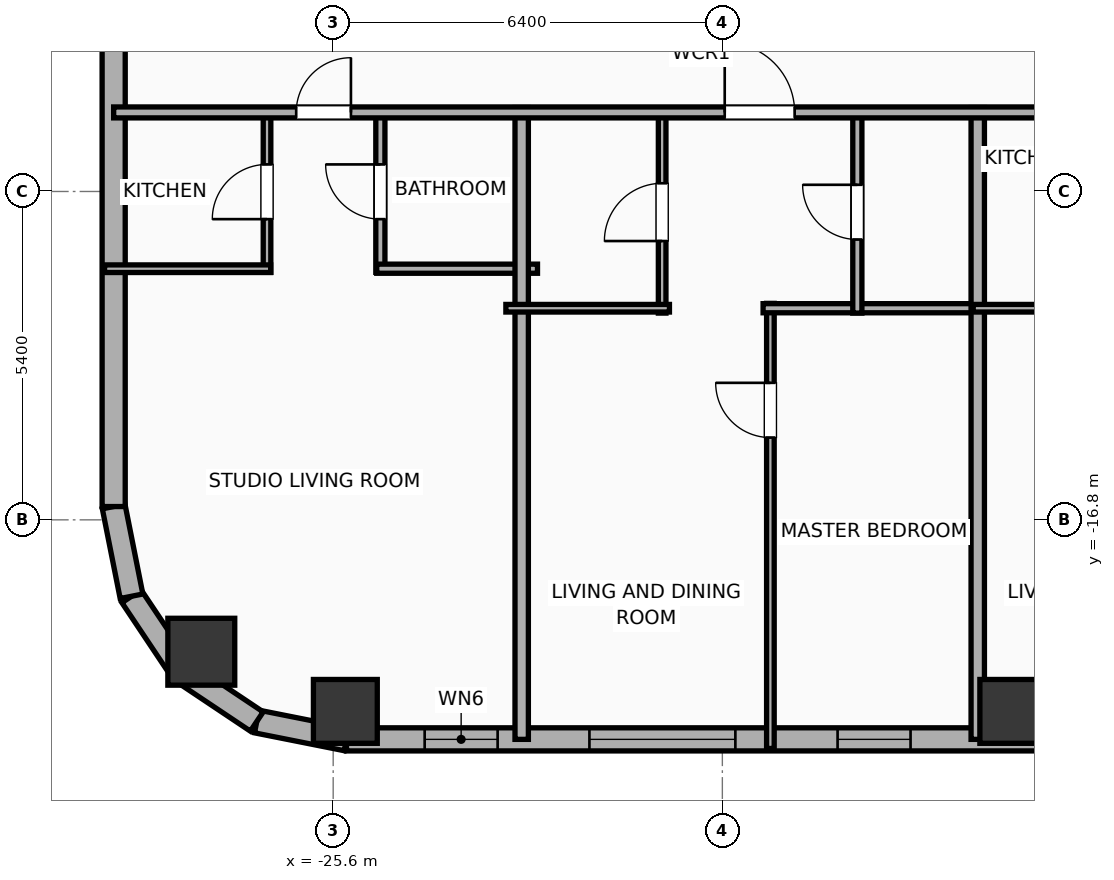
"""IFC4 building model, lengths in metres.
Left out: names, types, materials, properties, quantities, classifications, styles, units other than length and angle.
Written with IfcOpenShell. Run it as: python <this file> out.ifc"""

import sys

from ifc_helpers import new_model, si_unit, direction, frame, frame_2d, origin, origin_2d, place, context, subcontext, project, spatial, rectangle, hollow_rectangle, hollow_circle, extrude, element, fill, save


model = new_model("IFC4")
c1 = context("Model", 3, precision=1e-05, world=origin(), true_north=direction((0.0, 1.0)))
c2 = subcontext(c1, "Body", "Model", "MODEL_VIEW")
j1 = project(units=[si_unit("LENGTHUNIT", "METRE"), si_unit("PLANEANGLEUNIT", "RADIAN")], contexts=[c1])
p1 = place(None, origin())
s1 = spatial("IfcSite", under=j1, at=p1, CompositionType="ELEMENT")
p2 = place(p1, origin())
s2 = spatial("IfcBuilding", under=s1, at=p2, CompositionType="ELEMENT")
p3 = place(p2, frame((0.0, 0.0, 136.5)))
s3 = spatial("IfcBuildingStorey", under=s2, at=p3, CompositionType="ELEMENT", Elevation=136.5)
for number, where, z_axis, x_axis in (
    (1, (-25.4, -19.95, 0.0), (0.0, 0.0, 1.0), (1.0, 0.0, 0.0)),
    (2, (-14.44, -19.95, 0.0), (0.0, 0.0, 1.0), (1.0, 0.0, 0.0)),
):
    element("IfcColumn", number, at=place(p3, frame(where, z_axis=z_axis, x_axis=x_axis)), inside=s3, PredefinedType="COLUMN", context=c2, shape_type="SweptSolid", body=[
        extrude(hollow_rectangle(XDim=1.05, YDim=1.05, WallThickness=0.036, at=origin_2d()), origin(), (0.0, 0.0, 1.0), 3.865),
    ])
p4 = place(p3, frame((-27.769, -18.969, 0.0), z_axis=(0.0, 0.0, 1.0), x_axis=(1.0, 0.0, 0.0)))
e3 = element("IfcColumn", 3, at=p4, inside=s3, PredefinedType="COLUMN", context=c2, shape_type="SweptSolid", body=[
    extrude(hollow_circle(Radius=0.55, WallThickness=0.036, at=origin_2d()), origin(), (0.0, 0.0, 1.0), 3.865),
])
p5 = place(p3, frame((29.381, -20.41, 0.0), z_axis=(0.0, 0.0, 1.0), x_axis=(-1.0, 0.0, 0.0)))
e4 = element("IfcWall", 4, at=p5, inside=s3, PredefinedType="ELEMENTEDWALL", context=c2, shape_type="SweptSolid", body=[
    extrude(rectangle(XDim=54.763, YDim=0.38, at=frame_2d((27.381, 0.0))), origin(), (0.0, 0.0, 1.0), 2.39),
])
p6 = place(p5, frame((7.295, 0.0, 0.75)))
e5 = element("IfcOpeningElement", 5, at=p6, cuts=e4, PredefinedType="OPENING", context=c2, shape_type="SweptSolid", body=[
    extrude(rectangle(XDim=2.4, YDim=1.45, at=frame_2d((1.2, 0.725))), frame((0.0, 0.2, 0.0), z_axis=(0.0, -1.0, 0.0), x_axis=(1.0, 0.0, 0.0)), (0.0, 0.0, 1.0), 0.4),
])
p7 = place(p5, frame((18.486, 0.0, 0.75)))
e6 = element("IfcOpeningElement", 6, at=p7, cuts=e4, PredefinedType="OPENING", context=c2, shape_type="SweptSolid", body=[
    extrude(rectangle(XDim=2.4, YDim=1.45, at=frame_2d((1.2, 0.725))), frame((0.0, 0.2, 0.0), z_axis=(0.0, -1.0, 0.0), x_axis=(1.0, 0.0, 0.0)), (0.0, 0.0, 1.0), 0.4),
])
p8 = place(p5, frame((33.877, 0.0, 0.75)))
e7 = element("IfcOpeningElement", 7, at=p8, cuts=e4, PredefinedType="OPENING", context=c2, shape_type="SweptSolid", body=[
    extrude(rectangle(XDim=2.4, YDim=1.45, at=frame_2d((1.2, 0.725))), frame((0.0, 0.2, 0.0), z_axis=(0.0, -1.0, 0.0), x_axis=(1.0, 0.0, 0.0)), (0.0, 0.0, 1.0), 0.4),
])
p9 = place(p5, frame((48.367, 0.0, 0.75)))
e8 = element("IfcOpeningElement", 8, at=p9, cuts=e4, PredefinedType="OPENING", context=c2, shape_type="SweptSolid", body=[
    extrude(rectangle(XDim=2.4, YDim=1.45, at=frame_2d((1.2, 0.725))), frame((0.0, 0.2, 0.0), z_axis=(0.0, -1.0, 0.0), x_axis=(1.0, 0.0, 0.0)), (0.0, 0.0, 1.0), 0.4),
])
p10 = place(p5, frame((52.277, 0.0, 0.55)))
e9 = element("IfcOpeningElement", 9, at=p10, cuts=e4, PredefinedType="OPENING", context=c2, shape_type="SweptSolid", body=[
    extrude(rectangle(XDim=1.2, YDim=1.15, at=frame_2d((0.6, 0.575))), frame((0.0, 0.2, 0.0), z_axis=(0.0, -1.0, 0.0), x_axis=(1.0, 0.0, 0.0)), (0.0, 0.0, 1.0), 0.4),
])
p11 = place(p5, frame((45.486, 0.0, 0.55)))
e10 = element("IfcOpeningElement", 10, at=p11, cuts=e4, PredefinedType="OPENING", context=c2, shape_type="SweptSolid", body=[
    extrude(rectangle(XDim=1.2, YDim=1.15, at=frame_2d((0.6, 0.575))), frame((0.0, 0.2, 0.0), z_axis=(0.0, -1.0, 0.0), x_axis=(1.0, 0.0, 0.0)), (0.0, 0.0, 1.0), 0.4),
])
p12 = place(p5, frame((41.736, 0.0, 0.55)))
e11 = element("IfcOpeningElement", 11, at=p12, cuts=e4, PredefinedType="OPENING", context=c2, shape_type="SweptSolid", body=[
    extrude(rectangle(XDim=1.2, YDim=1.15, at=frame_2d((0.6, 0.575))), frame((0.0, 0.2, 0.0), z_axis=(0.0, -1.0, 0.0), x_axis=(1.0, 0.0, 0.0)), (0.0, 0.0, 1.0), 0.4),
])
p13 = place(p5, frame((37.986, 0.0, 0.55)))
e12 = element("IfcOpeningElement", 12, at=p13, cuts=e4, PredefinedType="OPENING", context=c2, shape_type="SweptSolid", body=[
    extrude(rectangle(XDim=1.2, YDim=1.15, at=frame_2d((0.6, 0.575))), frame((0.0, 0.2, 0.0), z_axis=(0.0, -1.0, 0.0), x_axis=(1.0, 0.0, 0.0)), (0.0, 0.0, 1.0), 0.4),
])
p14 = place(p5, frame((30.486, 0.0, 0.55)))
e13 = element("IfcOpeningElement", 13, at=p14, cuts=e4, PredefinedType="OPENING", context=c2, shape_type="SweptSolid", body=[
    extrude(rectangle(XDim=1.2, YDim=1.15, at=frame_2d((0.6, 0.575))), frame((0.0, 0.2, 0.0), z_axis=(0.0, -1.0, 0.0), x_axis=(1.0, 0.0, 0.0)), (0.0, 0.0, 1.0), 0.4),
])
p15 = place(p5, frame((26.736, 0.0, 0.55)))
e14 = element("IfcOpeningElement", 14, at=p15, cuts=e4, PredefinedType="OPENING", context=c2, shape_type="SweptSolid", body=[
    extrude(rectangle(XDim=1.2, YDim=1.15, at=frame_2d((0.6, 0.575))), frame((0.0, 0.2, 0.0), z_axis=(0.0, -1.0, 0.0), x_axis=(1.0, 0.0, 0.0)), (0.0, 0.0, 1.0), 0.4),
])
p16 = place(p5, frame((22.986, 0.0, 0.55)))
e15 = element("IfcOpeningElement", 15, at=p16, cuts=e4, PredefinedType="OPENING", context=c2, shape_type="SweptSolid", body=[
    extrude(rectangle(XDim=1.2, YDim=1.15, at=frame_2d((0.6, 0.575))), frame((0.0, 0.2, 0.0), z_axis=(0.0, -1.0, 0.0), x_axis=(1.0, 0.0, 0.0)), (0.0, 0.0, 1.0), 0.4),
])
p17 = place(p5, frame((15.486, 0.0, 0.55)))
e16 = element("IfcOpeningElement", 16, at=p17, cuts=e4, PredefinedType="OPENING", context=c2, shape_type="SweptSolid", body=[
    extrude(rectangle(XDim=1.2, YDim=1.15, at=frame_2d((0.6, 0.575))), frame((0.0, 0.2, 0.0), z_axis=(0.0, -1.0, 0.0), x_axis=(1.0, 0.0, 0.0)), (0.0, 0.0, 1.0), 0.4),
])
p18 = place(p5, frame((11.736, 0.0, 0.55)))
e17 = element("IfcOpeningElement", 17, at=p18, cuts=e4, PredefinedType="OPENING", context=c2, shape_type="SweptSolid", body=[
    extrude(rectangle(XDim=1.2, YDim=1.15, at=frame_2d((0.6, 0.575))), frame((0.0, 0.2, 0.0), z_axis=(0.0, -1.0, 0.0), x_axis=(1.0, 0.0, 0.0)), (0.0, 0.0, 1.0), 0.4),
])
p19 = place(p5, frame((3.286, 0.0, 0.55)))
e18 = element("IfcOpeningElement", 18, at=p19, cuts=e4, PredefinedType="OPENING", context=c2, shape_type="SweptSolid", body=[
    extrude(rectangle(XDim=1.2, YDim=1.15, at=frame_2d((0.6, 0.575))), frame((0.0, 0.2, 0.0), z_axis=(0.0, -1.0, 0.0), x_axis=(1.0, 0.0, 0.0)), (0.0, 0.0, 1.0), 0.4),
])
p20 = place(p3, frame((-25.381, -20.41, 0.0), z_axis=(0.0, 0.0, 1.0), x_axis=(-0.980786132421, 0.195086038585, 0.0)))
e19 = element("IfcWall", 19, at=p20, inside=s3, PredefinedType="ELEMENTEDWALL", context=c2, shape_type="SweptSolid", body=[
    extrude(rectangle(XDim=1.504, YDim=0.38, at=frame_2d((0.752, 0.0))), origin(), (0.0, 0.0, 1.0), 2.39),
])
p21 = place(p3, frame((-26.857, -20.116, 0.0), z_axis=(0.0, 0.0, 1.0), x_axis=(-0.831468045563, 0.555572577804, 0.0)))
e20 = element("IfcWall", 20, at=p21, inside=s3, PredefinedType="ELEMENTEDWALL", context=c2, shape_type="SweptSolid", body=[
    extrude(rectangle(XDim=1.485, YDim=0.38, at=frame_2d((0.742, 0.0))), origin(), (0.0, 0.0, 1.0), 2.39),
])
p22 = place(p3, frame((-28.091, -19.292, 0.0), z_axis=(0.0, 0.0, 1.0), x_axis=(-0.555610286119, 0.831442848281, 0.0)))
e21 = element("IfcWall", 21, at=p22, inside=s3, PredefinedType="ELEMENTEDWALL", context=c2, shape_type="SweptSolid", body=[
    extrude(rectangle(XDim=1.485, YDim=0.38, at=frame_2d((0.743, 0.0))), origin(), (0.0, 0.0, 1.0), 3.5),
])
p23 = place(p3, frame((-28.917, -18.057, 0.0), z_axis=(0.0, 0.0, 1.0), x_axis=(-0.195086038585, 0.980786132421, 0.0)))
e22 = element("IfcWall", 22, at=p23, inside=s3, PredefinedType="ELEMENTEDWALL", context=c2, shape_type="SweptSolid", body=[
    extrude(rectangle(XDim=1.504, YDim=0.38, at=frame_2d((0.752, 0.0))), origin(), (0.0, 0.0, 1.0), 3.5),
])
p24 = place(p3, frame((-29.21, -16.581, 0.0), z_axis=(0.0, 0.0, 1.0), x_axis=(0.0, 1.0, 0.0)))
e23 = element("IfcWall", 23, at=p24, inside=s3, PredefinedType="ELEMENTEDWALL", context=c2, shape_type="SweptSolid", body=[
    extrude(rectangle(XDim=34.363, YDim=0.38, at=frame_2d((17.181, 0.0))), origin(), (0.0, 0.0, 1.0), 2.39),
])
p25 = place(p24, frame((30.757, 0.0, 0.55)))
e24 = element("IfcOpeningElement", 24, at=p25, cuts=e23, PredefinedType="OPENING", context=c2, shape_type="SweptSolid", body=[
    extrude(rectangle(XDim=1.2, YDim=1.15, at=frame_2d((0.6, 0.575))), frame((0.0, 0.2, 0.0), z_axis=(0.0, -1.0, 0.0), x_axis=(1.0, 0.0, 0.0)), (0.0, 0.0, 1.0), 0.4),
])
p26 = place(p24, frame((20.326, 0.0, 0.55)))
e25 = element("IfcOpeningElement", 25, at=p26, cuts=e23, PredefinedType="OPENING", context=c2, shape_type="SweptSolid", body=[
    extrude(rectangle(XDim=1.2, YDim=1.15, at=frame_2d((0.6, 0.575))), frame((0.0, 0.2, 0.0), z_axis=(0.0, -1.0, 0.0), x_axis=(1.0, 0.0, 0.0)), (0.0, 0.0, 1.0), 0.4),
])
p27 = place(p24, frame((11.776, 0.0, 0.55)))
e26 = element("IfcOpeningElement", 26, at=p27, cuts=e23, PredefinedType="OPENING", context=c2, shape_type="SweptSolid", body=[
    extrude(rectangle(XDim=1.2, YDim=1.15, at=frame_2d((0.6, 0.575))), frame((0.0, 0.2, 0.0), z_axis=(0.0, -1.0, 0.0), x_axis=(1.0, 0.0, 0.0)), (0.0, 0.0, 1.0), 0.4),
])
p28 = place(p3, frame((-26.688, -12.73, 0.0), z_axis=(0.0, 0.0, 1.0), x_axis=(0.0, 1.0, 0.0)))
e27 = element("IfcWall", 27, at=p28, inside=s3, PredefinedType="PARTITIONING", context=c2, shape_type="SweptSolid", body=[
    extrude(rectangle(XDim=2.65, YDim=0.125, at=frame_2d((1.325, 0.0))), origin(), (0.0, 0.0, 1.0), 3.5),
])
p29 = place(p28, frame((0.875, 0.0, 0.0)))
e28 = element("IfcOpeningElement", 28, at=p29, cuts=e27, PredefinedType="OPENING", context=c2, shape_type="SweptSolid", body=[
    extrude(rectangle(XDim=0.9, YDim=2.05, at=frame_2d((0.45, 1.025))), frame((0.0, 0.073, 0.0), z_axis=(0.0, -1.0, 0.0), x_axis=(1.0, 0.0, 0.0)), (0.0, 0.0, 1.0), 0.145),
])
p30 = place(p3, frame((-24.824, -12.73, 0.0), z_axis=(0.0, 0.0, 1.0), x_axis=(0.0, 1.0, 0.0)))
e29 = element("IfcWall", 29, at=p30, inside=s3, PredefinedType="PLUMBINGWALL", context=c2, shape_type="SweptSolid", body=[
    extrude(rectangle(XDim=2.65, YDim=0.15, at=frame_2d((1.325, 0.0))), origin(), (0.0, 0.0, 1.0), 3.5),
])
p31 = place(p30, frame((0.875, 0.0, 0.0)))
e30 = element("IfcOpeningElement", 30, at=p31, cuts=e29, PredefinedType="OPENING", context=c2, shape_type="SweptSolid", body=[
    extrude(rectangle(XDim=0.9, YDim=2.05, at=frame_2d((0.45, 1.025))), frame((0.0, 0.085, 0.0), z_axis=(0.0, -1.0, 0.0), x_axis=(1.0, 0.0, 0.0)), (0.0, 0.0, 1.0), 0.17),
])
p32 = place(p3, frame((-29.36, -12.67, 0.0), z_axis=(0.0, 0.0, 1.0), x_axis=(1.0, 0.0, 0.0)))
e31 = element("IfcWall", 31, at=p32, inside=s3, PredefinedType="PARTITIONING", context=c2, shape_type="SweptSolid", body=[
    extrude(rectangle(XDim=2.732, YDim=0.125, at=frame_2d((1.366, 0.0))), origin(), (0.0, 0.0, 1.0), 3.5),
])
p33 = place(p3, frame((-24.884, -12.67, 0.0), z_axis=(0.0, 0.0, 1.0), x_axis=(1.0, 0.0, 0.0)))
e32 = element("IfcWall", 32, at=p33, inside=s3, PredefinedType="PLUMBINGWALL", context=c2, shape_type="SweptSolid", body=[
    extrude(rectangle(XDim=2.644, YDim=0.15, at=frame_2d((1.322, 0.0))), origin(), (0.0, 0.0, 1.0), 3.5),
])
p34 = place(p3, frame((-22.5, -20.41, 0.0), z_axis=(0.0, 0.0, 1.0), x_axis=(0.0, 1.0, 0.0)))
e33 = element("IfcWall", 33, at=p34, inside=s3, PredefinedType="PARTITIONING", context=c2, shape_type="SweptSolid", body=[
    extrude(rectangle(XDim=10.39, YDim=0.22, at=frame_2d((5.195, 0.0))), origin(), (0.0, 0.0, 1.0), 3.5),
])
p35 = place(p3, frame((-18.41, -20.56, 0.0), z_axis=(0.0, 0.0, 1.0), x_axis=(0.0, 1.0, 0.0)))
e34 = element("IfcWall", 34, at=p35, inside=s3, PredefinedType="PARTITIONING", context=c2, shape_type="SweptSolid", body=[
    extrude(rectangle(XDim=7.32, YDim=0.125, at=frame_2d((3.66, 0.0))), origin(), (0.0, 0.0, 1.0), 3.5),
])
p36 = place(p35, frame((5.113, 0.0, 0.0)))
e35 = element("IfcOpeningElement", 35, at=p36, cuts=e34, PredefinedType="OPENING", context=c2, shape_type="SweptSolid", body=[
    extrude(rectangle(XDim=0.9, YDim=2.05, at=frame_2d((0.45, 1.025))), frame((0.0, 0.073, 0.0), z_axis=(0.0, -1.0, 0.0), x_axis=(1.0, 0.0, 0.0)), (0.0, 0.0, 1.0), 0.145),
])
p37 = place(p3, frame((-18.53, -13.32, 0.0), z_axis=(0.0, 0.0, 1.0), x_axis=(1.0, 0.0, 0.0)))
e36 = element("IfcWall", 36, at=p37, inside=s3, PredefinedType="PLUMBINGWALL", context=c2, shape_type="SweptSolid", body=[
    extrude(rectangle(XDim=3.605, YDim=0.15, at=frame_2d((1.802, 0.0))), origin(), (0.0, 0.0, 1.0), 3.5),
])
p38 = place(p3, frame((-20.19, -13.4, 0.0), z_axis=(0.0, 0.0, 1.0), x_axis=(0.0, 1.0, 0.0)))
e37 = element("IfcWall", 37, at=p38, inside=s3, PredefinedType="PARTITIONING", context=c2, shape_type="SweptSolid", body=[
    extrude(rectangle(XDim=3.32, YDim=0.125, at=frame_2d((1.66, 0.0))), origin(), (0.0, 0.0, 1.0), 3.5),
])
p39 = place(p38, frame((1.185, 0.0, 0.0)))
e38 = element("IfcOpeningElement", 38, at=p39, cuts=e37, PredefinedType="OPENING", context=c2, shape_type="SweptSolid", body=[
    extrude(rectangle(XDim=0.95, YDim=2.05, at=frame_2d((0.475, 1.025))), frame((0.0, 0.073, 0.0), z_axis=(0.0, -1.0, 0.0), x_axis=(1.0, 0.0, 0.0)), (0.0, 0.0, 1.0), 0.145),
])
p40 = place(p3, frame((-22.76, -13.32, 0.0), z_axis=(0.0, 0.0, 1.0), x_axis=(1.0, 0.0, 0.0)))
e39 = element("IfcWall", 39, at=p40, inside=s3, PredefinedType="PARTITIONING", context=c2, shape_type="SweptSolid", body=[
    extrude(rectangle(XDim=2.69, YDim=0.125, at=frame_2d((1.345, 0.0))), origin(), (0.0, 0.0, 1.0), 3.5),
])
p41 = place(p3, frame((-16.98, -13.4, 0.0), z_axis=(0.0, 0.0, 1.0), x_axis=(0.0, 1.0, 0.0)))
e40 = element("IfcWall", 40, at=p41, inside=s3, PredefinedType="PLUMBINGWALL", context=c2, shape_type="SweptSolid", body=[
    extrude(rectangle(XDim=3.32, YDim=0.15, at=frame_2d((1.66, 0.0))), origin(), (0.0, 0.0, 1.0), 3.5),
])
p42 = place(p41, frame((1.21, 0.0, 0.0)))
e41 = element("IfcOpeningElement", 41, at=p42, cuts=e40, PredefinedType="OPENING", context=c2, shape_type="SweptSolid", body=[
    extrude(rectangle(XDim=0.9, YDim=2.05, at=frame_2d((0.45, 1.025))), frame((0.0, 0.085, 0.0), z_axis=(0.0, -1.0, 0.0), x_axis=(1.0, 0.0, 0.0)), (0.0, 0.0, 1.0), 0.17),
])
p43 = place(p3, frame((-15.0, -20.41, 0.0), z_axis=(0.0, 0.0, 1.0), x_axis=(0.0, 1.0, 0.0)))
e42 = element("IfcWall", 42, at=p43, inside=s3, PredefinedType="PARTITIONING", context=c2, shape_type="SweptSolid", body=[
    extrude(rectangle(XDim=10.39, YDim=0.22, at=frame_2d((5.195, 0.0))), origin(), (0.0, 0.0, 1.0), 2.39),
])
p44 = place(p3, frame((-15.075, -13.32, 0.0), z_axis=(0.0, 0.0, 1.0), x_axis=(1.0, 0.0, 0.0)))
e43 = element("IfcWall", 43, at=p44, inside=s3, PredefinedType="PARTITIONING", context=c2, shape_type="SweptSolid", body=[
    extrude(rectangle(XDim=2.505, YDim=0.125, at=frame_2d((1.252, 0.0))), origin(), (0.0, 0.0, 1.0), 3.5),
])
p45 = place(p3, frame((-29.21, -10.1, 0.0), z_axis=(0.0, 0.0, 1.0), x_axis=(1.0, 0.0, 0.0)))
e44 = element("IfcWall", 44, at=p45, inside=s3, PredefinedType="PARTITIONING", context=c2, shape_type="SweptSolid", body=[
    extrude(rectangle(XDim=62.42, YDim=0.18, at=frame_2d((31.21, 0.0))), origin(), (0.0, 0.0, 1.0), 2.39),
])
p46 = place(p45, frame((3.002, 0.0, 0.0)))
e45 = element("IfcOpeningElement", 45, at=p46, cuts=e44, PredefinedType="OPENING", context=c2, shape_type="SweptSolid", body=[
    extrude(rectangle(XDim=0.9, YDim=2.05, at=frame_2d((0.45, 1.025))), frame((0.0, 0.1, 0.0), z_axis=(0.0, -1.0, 0.0), x_axis=(1.0, 0.0, 0.0)), (0.0, 0.0, 1.0), 0.2),
])
p47 = place(p45, frame((10.049, 0.0, 0.0)))
e46 = element("IfcOpeningElement", 46, at=p47, cuts=e44, PredefinedType="OPENING", context=c2, shape_type="SweptSolid", body=[
    extrude(rectangle(XDim=1.15, YDim=2.05, at=frame_2d((0.575, 1.025))), frame((0.0, 0.1, 0.0), z_axis=(0.0, -1.0, 0.0), x_axis=(1.0, 0.0, 0.0)), (0.0, 0.0, 1.0), 0.2),
])
p48 = place(p45, frame((17.552, 0.0, 0.0)))
e47 = element("IfcOpeningElement", 47, at=p48, cuts=e44, PredefinedType="OPENING", context=c2, shape_type="SweptSolid", body=[
    extrude(rectangle(XDim=1.15, YDim=2.05, at=frame_2d((0.575, 1.025))), frame((0.0, 0.1, 0.0), z_axis=(0.0, -1.0, 0.0), x_axis=(1.0, 0.0, 0.0)), (0.0, 0.0, 1.0), 0.2),
])
p49 = place(p45, frame((25.048, 0.0, 0.0)))
e48 = element("IfcOpeningElement", 48, at=p49, cuts=e44, PredefinedType="OPENING", context=c2, shape_type="SweptSolid", body=[
    extrude(rectangle(XDim=1.15, YDim=2.05, at=frame_2d((0.575, 1.025))), frame((0.0, 0.1, 0.0), z_axis=(0.0, -1.0, 0.0), x_axis=(1.0, 0.0, 0.0)), (0.0, 0.0, 1.0), 0.2),
])
p50 = place(p45, frame((32.551, 0.0, 0.0)))
e49 = element("IfcOpeningElement", 49, at=p50, cuts=e44, PredefinedType="OPENING", context=c2, shape_type="SweptSolid", body=[
    extrude(rectangle(XDim=1.15, YDim=2.05, at=frame_2d((0.575, 1.025))), frame((0.0, 0.1, 0.0), z_axis=(0.0, -1.0, 0.0), x_axis=(1.0, 0.0, 0.0)), (0.0, 0.0, 1.0), 0.2),
])
p51 = place(p45, frame((40.048, 0.0, 0.0)))
e50 = element("IfcOpeningElement", 50, at=p51, cuts=e44, PredefinedType="OPENING", context=c2, shape_type="SweptSolid", body=[
    extrude(rectangle(XDim=1.15, YDim=2.05, at=frame_2d((0.575, 1.025))), frame((0.0, 0.1, 0.0), z_axis=(0.0, -1.0, 0.0), x_axis=(1.0, 0.0, 0.0)), (0.0, 0.0, 1.0), 0.2),
])
p52 = place(p45, frame((47.551, 0.0, 0.0)))
e51 = element("IfcOpeningElement", 51, at=p52, cuts=e44, PredefinedType="OPENING", context=c2, shape_type="SweptSolid", body=[
    extrude(rectangle(XDim=1.15, YDim=2.05, at=frame_2d((0.575, 1.025))), frame((0.0, 0.1, 0.0), z_axis=(0.0, -1.0, 0.0), x_axis=(1.0, 0.0, 0.0)), (0.0, 0.0, 1.0), 0.2),
])
p53 = place(p45, frame((57.064, 0.0, 0.0)))
e52 = element("IfcOpeningElement", 52, at=p53, cuts=e44, PredefinedType="OPENING", context=c2, shape_type="SweptSolid", body=[
    extrude(rectangle(XDim=1.15, YDim=2.05, at=frame_2d((0.575, 1.025))), frame((0.0, 0.1, 0.0), z_axis=(0.0, -1.0, 0.0), x_axis=(1.0, 0.0, 0.0)), (0.0, 0.0, 1.0), 0.2),
])
p54 = place(p9, origin())
e53 = element("IfcWindow", 53, at=p54, inside=s3, PartitioningType="SINGLE_PANEL", PredefinedType="WINDOW", context=c2, shape_type="SweptSolid", body=[
    extrude(rectangle(XDim=2.4, YDim=1.45, at=frame_2d((1.2, 0.725))), frame((0.0, 0.03, 0.0), z_axis=(0.0, -1.0, 0.0), x_axis=(1.0, 0.0, 0.0)), (0.0, 0.0, 1.0), 0.06),
])
fill(e8, e53)
p55 = place(p10, origin())
e54 = element("IfcWindow", 54, at=p55, inside=s3, PartitioningType="SINGLE_PANEL", PredefinedType="WINDOW", context=c2, shape_type="SweptSolid", body=[
    extrude(rectangle(XDim=1.2, YDim=1.15, at=frame_2d((0.6, 0.575))), frame((0.0, 0.03, 0.0), z_axis=(0.0, -1.0, 0.0), x_axis=(1.0, 0.0, 0.0)), (0.0, 0.0, 1.0), 0.06),
])
fill(e9, e54)
p56 = place(p11, origin())
e55 = element("IfcWindow", 55, at=p56, inside=s3, PartitioningType="SINGLE_PANEL", PredefinedType="WINDOW", context=c2, shape_type="SweptSolid", body=[
    extrude(rectangle(XDim=1.2, YDim=1.15, at=frame_2d((0.6, 0.575))), frame((0.0, 0.03, 0.0), z_axis=(0.0, -1.0, 0.0), x_axis=(1.0, 0.0, 0.0)), (0.0, 0.0, 1.0), 0.06),
])
fill(e10, e55)
p57 = place(p29, origin())
e56 = element("IfcDoor", 56, at=p57, inside=s3, OperationType="SINGLE_SWING_LEFT", PredefinedType="DOOR", context=c2, shape_type="SweptSolid", body=[
    extrude(rectangle(XDim=0.9, YDim=2.05, at=frame_2d((0.45, 1.025))), frame((0.0, 0.025, 0.0), z_axis=(0.0, -1.0, 0.0), x_axis=(1.0, 0.0, 0.0)), (0.0, 0.0, 1.0), 0.05),
])
fill(e28, e56)
p58 = place(p31, origin())
e57 = element("IfcDoor", 57, at=p58, inside=s3, OperationType="SINGLE_SWING_RIGHT", PredefinedType="DOOR", context=c2, shape_type="SweptSolid", body=[
    extrude(rectangle(XDim=0.9, YDim=2.05, at=frame_2d((0.45, 1.025))), frame((0.0, 0.025, 0.0), z_axis=(0.0, -1.0, 0.0), x_axis=(1.0, 0.0, 0.0)), (0.0, 0.0, 1.0), 0.05),
])
fill(e30, e57)
p59 = place(p36, origin())
e58 = element("IfcDoor", 58, at=p59, inside=s3, OperationType="SINGLE_SWING_RIGHT", PredefinedType="DOOR", context=c2, shape_type="SweptSolid", body=[
    extrude(rectangle(XDim=0.9, YDim=2.05, at=frame_2d((0.45, 1.025))), frame((0.0, 0.025, 0.0), z_axis=(0.0, -1.0, 0.0), x_axis=(1.0, 0.0, 0.0)), (0.0, 0.0, 1.0), 0.05),
])
fill(e35, e58)
p60 = place(p39, origin())
e59 = element("IfcDoor", 59, at=p60, inside=s3, OperationType="SINGLE_SWING_LEFT", PredefinedType="DOOR", context=c2, shape_type="SweptSolid", body=[
    extrude(rectangle(XDim=0.95, YDim=2.05, at=frame_2d((0.475, 1.025))), frame((0.0, 0.025, 0.0), z_axis=(0.0, -1.0, 0.0), x_axis=(1.0, 0.0, 0.0)), (0.0, 0.0, 1.0), 0.05),
])
fill(e38, e59)
p61 = place(p42, origin())
e60 = element("IfcDoor", 60, at=p61, inside=s3, OperationType="SINGLE_SWING_RIGHT", PredefinedType="DOOR", context=c2, shape_type="SweptSolid", body=[
    extrude(rectangle(XDim=0.9, YDim=2.05, at=frame_2d((0.45, 1.025))), frame((0.0, 0.025, 0.0), z_axis=(0.0, -1.0, 0.0), x_axis=(1.0, 0.0, 0.0)), (0.0, 0.0, 1.0), 0.05),
])
fill(e41, e60)
p62 = place(p46, origin())
e61 = element("IfcDoor", 61, at=p62, inside=s3, OperationType="SINGLE_SWING_RIGHT", PredefinedType="DOOR", context=c2, shape_type="SweptSolid", body=[
    extrude(rectangle(XDim=0.9, YDim=2.05, at=frame_2d((0.45, 1.025))), frame((0.0, 0.025, 0.0), z_axis=(0.0, -1.0, 0.0), x_axis=(1.0, 0.0, 0.0)), (0.0, 0.0, 1.0), 0.05),
])
fill(e45, e61)
p63 = place(p47, origin())
e62 = element("IfcDoor", 62, at=p63, inside=s3, OperationType="SINGLE_SWING_LEFT", PredefinedType="DOOR", context=c2, shape_type="SweptSolid", body=[
    extrude(rectangle(XDim=1.15, YDim=2.05, at=frame_2d((0.575, 1.025))), frame((0.0, 0.025, 0.0), z_axis=(0.0, -1.0, 0.0), x_axis=(1.0, 0.0, 0.0)), (0.0, 0.0, 1.0), 0.05),
])
fill(e46, e62)
save(model, sys.argv[1])
